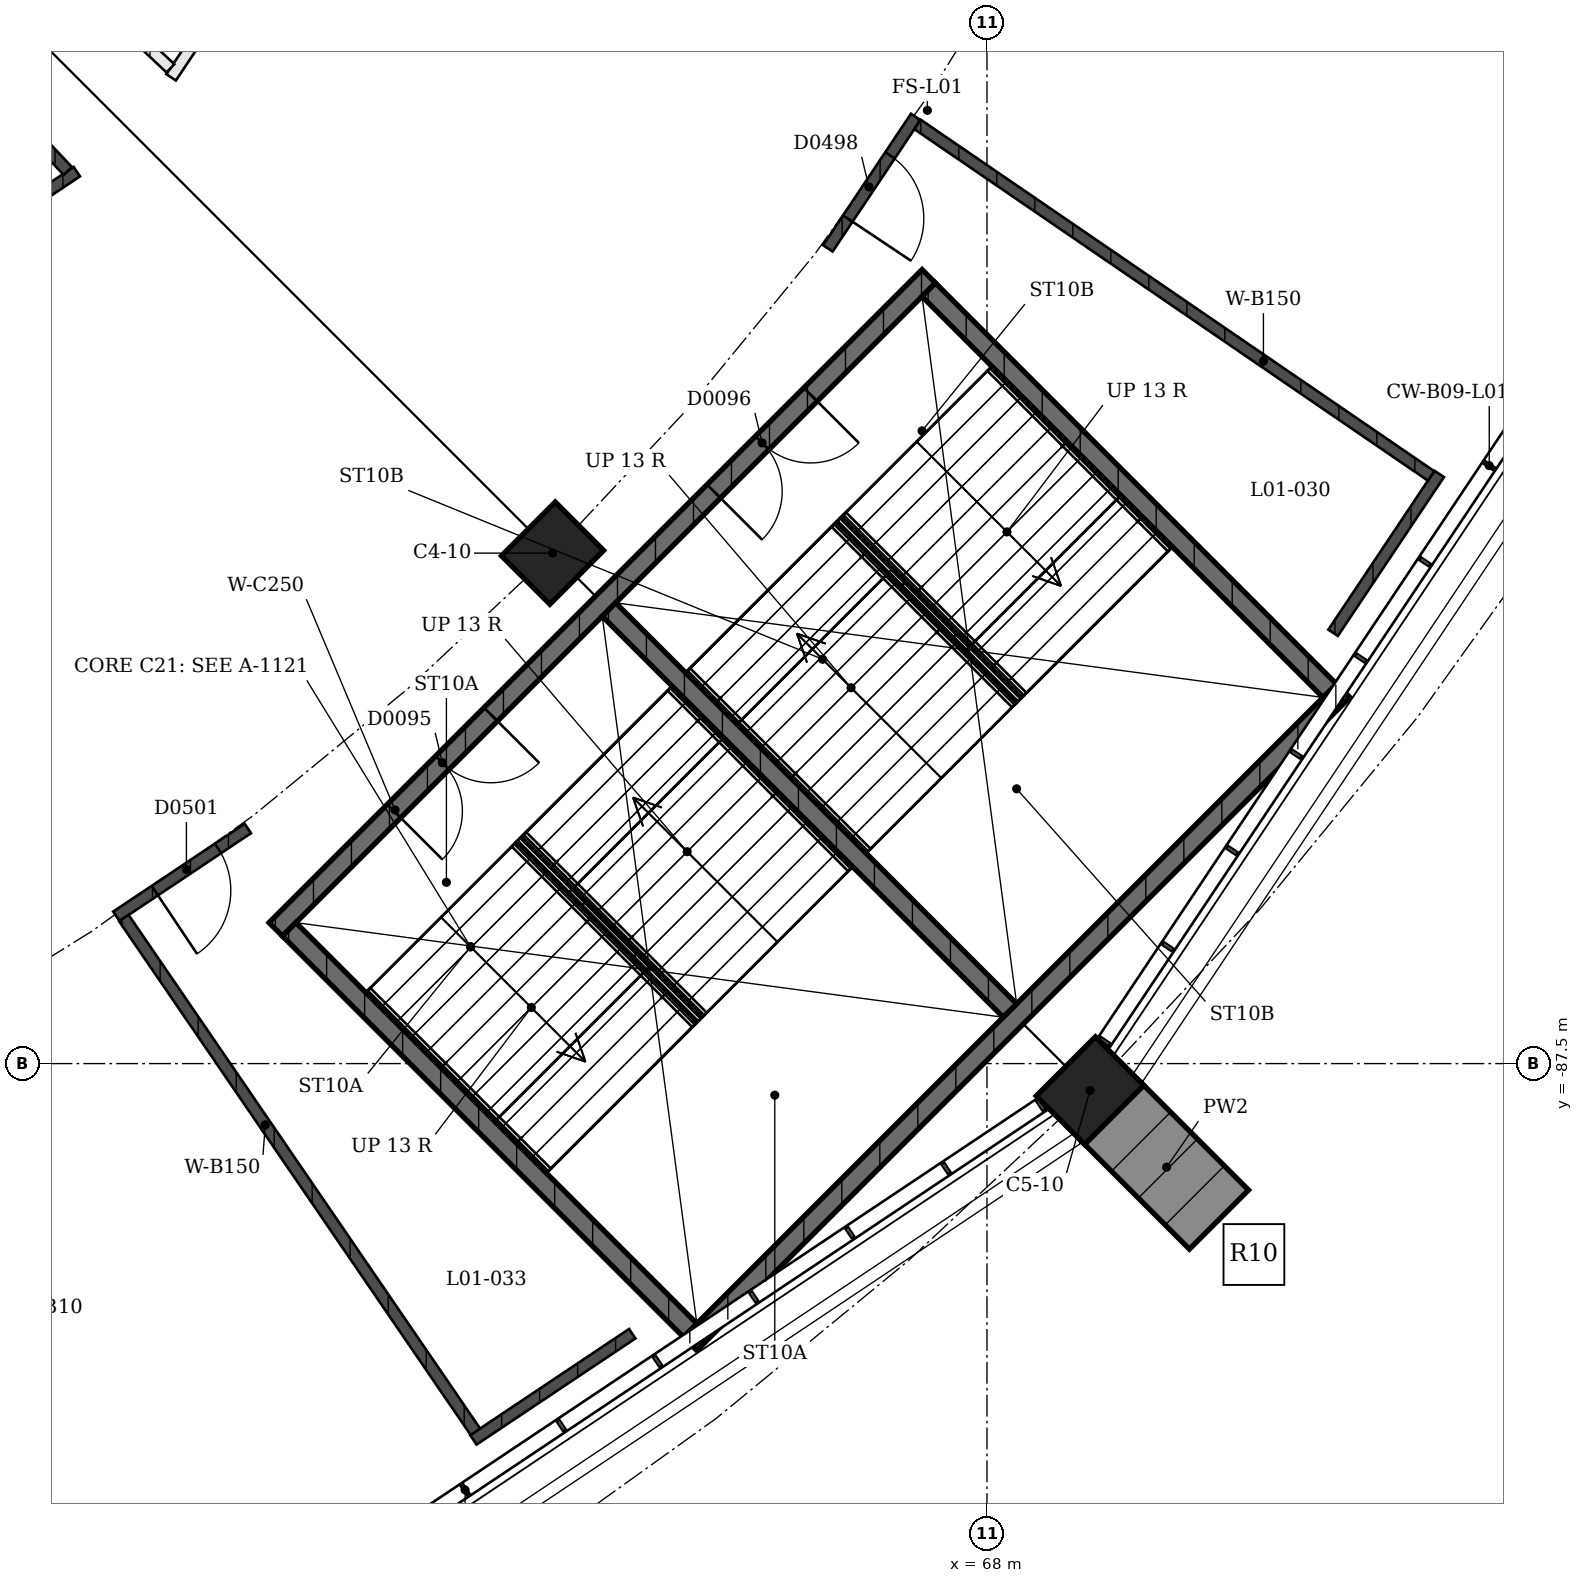
"""IFC4 building model, lengths in metres.
Left out: names, types, materials, properties, quantities, classifications, styles, units other than length and angle.
Written with IfcOpenShell. Run it as: python <this file> out.ifc"""

import sys

from ifc_helpers import new_model, si_unit, direction, frame, frame_2d, origin, origin_2d, place, context, subcontext, project, spatial, rectangle, extrude, element, fill, save


model = new_model("IFC4")
c1 = context("Model", 3, precision=1e-05, world=origin(), true_north=direction((0.0, 1.0)))
c2 = subcontext(c1, "Body", "Model", "MODEL_VIEW")
j1 = project(units=[si_unit("LENGTHUNIT", "METRE"), si_unit("PLANEANGLEUNIT", "RADIAN")], contexts=[c1])
p1 = place(None, origin())
s1 = spatial("IfcSite", under=j1, at=p1, CompositionType="ELEMENT")
p2 = place(p1, origin())
s2 = spatial("IfcBuilding", under=s1, at=p2, CompositionType="ELEMENT")
p3 = place(p2, frame((0.0, 0.0, 4.5)))
s3 = spatial("IfcBuildingStorey", under=s2, at=p3, CompositionType="ELEMENT", Elevation=4.5)
p4 = place(p3, frame((62.284, -80.784, 0.0), z_axis=(0.0, 0.0, 1.0), x_axis=(0.707106781187, 0.707106781187, 0.0)))
e1 = element("IfcColumn", 1, at=p4, inside=s3, PredefinedType="COLUMN", context=c2, shape_type="SweptSolid", body=[
    extrude(rectangle(XDim=1.0, YDim=0.9, at=origin_2d()), origin(), (0.0, 0.0, 1.0), 4.5),
])
p5 = place(p3, frame((69.355, -87.855, 0.0), z_axis=(0.0, 0.0, 1.0), x_axis=(0.707106781187, 0.707106781187, 0.0)))
e2 = element("IfcColumn", 2, at=p5, inside=s3, PredefinedType="COLUMN", context=c2, shape_type="SweptSolid", body=[
    extrude(rectangle(XDim=1.1, YDim=0.9, at=origin_2d()), origin(), (0.0, 0.0, 1.0), 4.5),
])
p6 = place(p3, frame((58.643, -85.734, 0.0), z_axis=(0.0, 0.0, 1.0), x_axis=(0.707106781187, 0.707106781187, 0.0)))
e3 = element("IfcWall", 3, at=p6, inside=s3, PredefinedType="SHEAR", context=c2, shape_type="SweptSolid", body=[
    extrude(rectangle(XDim=12.15, YDim=0.25, at=frame_2d((6.075, 0.0))), origin(), (0.0, 0.0, 1.0), 4.09),
])
p7 = place(p6, frame((2.2, 0.0, 0.0)))
e4 = element("IfcOpeningElement", 4, at=p7, cuts=e3, PredefinedType="OPENING", context=c2, shape_type="SweptSolid", body=[
    extrude(rectangle(XDim=1.8, YDim=2.1, at=frame_2d((0.9, 1.05))), frame((0.0, 0.125, 0.0), z_axis=(0.0, -1.0, 0.0), x_axis=(1.0, 0.0, 0.0)), (0.0, 0.0, 1.0), 0.25),
])
p8 = place(p6, frame((8.15, 0.0, 0.0)))
e5 = element("IfcOpeningElement", 5, at=p8, cuts=e3, PredefinedType="OPENING", context=c2, shape_type="SweptSolid", body=[
    extrude(rectangle(XDim=1.8, YDim=2.1, at=frame_2d((0.9, 1.05))), frame((0.0, 0.125, 0.0), z_axis=(0.0, -1.0, 0.0), x_axis=(1.0, 0.0, 0.0)), (0.0, 0.0, 1.0), 0.25),
])
p9 = place(p3, frame((64.094, -91.186, 0.0), z_axis=(0.0, 0.0, 1.0), x_axis=(0.707106781187, 0.707106781187, 0.0)))
e6 = element("IfcWall", 6, at=p9, inside=s3, PredefinedType="SHEAR", context=c2, shape_type="SweptSolid", body=[
    extrude(rectangle(XDim=12.15, YDim=0.25, at=frame_2d((6.075, 0.0))), origin(), (0.0, 0.0, 1.0), 4.09),
])
for number, where, z_axis, x_axis in (
    (7, (58.819, -85.734, 0.0), (0.0, 0.0, 1.0), (0.707, -0.707, 0.0)),
    (8, (67.234, -77.319, 0.0), (0.0, 0.0, 1.0), (0.707, -0.707, 0.0)),
):
    element("IfcWall", number, at=place(p3, frame(where, z_axis=z_axis, x_axis=x_axis)), inside=s3, PredefinedType="SHEAR", context=c2, shape_type="SweptSolid", body=[
        extrude(rectangle(XDim=7.46, YDim=0.25, at=frame_2d((3.73, 0.0))), origin(), (0.0, 0.0, 1.0), 4.09),
    ])
p10 = place(p3, frame((63.027, -81.527, 0.0), z_axis=(0.0, 0.0, 1.0), x_axis=(0.707106781187, -0.707106781187, 0.0)))
e9 = element("IfcWall", 9, at=p10, inside=s3, PredefinedType="SHEAR", context=c2, shape_type="SweptSolid", body=[
    extrude(rectangle(XDim=7.46, YDim=0.25, at=frame_2d((3.73, 0.0))), origin(), (0.0, 0.0, 1.0), 4.09),
])
p11 = place(p3, frame((57.266, -74.525, 0.0), z_axis=(0.0, 0.0, 1.0), x_axis=(0.555562662276, 0.831474670862, 0.0)))
e10 = element("IfcWall", 10, at=p11, inside=s3, PredefinedType="PARTITIONING", context=c2, shape_type="SweptSolid", body=[
    extrude(rectangle(XDim=10.775, YDim=0.15, at=frame_2d((5.387, 0.0))), origin(), (0.0, 0.0, 1.0), 3.0),
])
p12 = place(p11, frame((1.276, 0.0, 0.0)))
e11 = element("IfcOpeningElement", 11, at=p12, cuts=e10, PredefinedType="OPENING", context=c2, shape_type="SweptSolid", body=[
    extrude(rectangle(XDim=0.9, YDim=2.1, at=frame_2d((0.45, 1.05))), frame((0.0, 0.075, 0.0), z_axis=(0.0, -1.0, 0.0), x_axis=(1.0, 0.0, 0.0)), (0.0, 0.0, 1.0), 0.15),
])
p13 = place(p11, frame((4.566, 0.0, 0.0)))
e12 = element("IfcOpeningElement", 12, at=p13, cuts=e10, PredefinedType="OPENING", context=c2, shape_type="SweptSolid", body=[
    extrude(rectangle(XDim=0.9, YDim=2.1, at=frame_2d((0.45, 1.05))), frame((0.0, 0.075, 0.0), z_axis=(0.0, -1.0, 0.0), x_axis=(1.0, 0.0, 0.0)), (0.0, 0.0, 1.0), 0.15),
])
p14 = place(p11, frame((7.119, 0.0, 0.0)))
e13 = element("IfcOpeningElement", 13, at=p14, cuts=e10, PredefinedType="OPENING", context=c2, shape_type="SweptSolid", body=[
    extrude(rectangle(XDim=1.1, YDim=2.1, at=frame_2d((0.55, 1.05))), frame((0.0, 0.075, 0.0), z_axis=(0.0, -1.0, 0.0), x_axis=(1.0, 0.0, 0.0)), (0.0, 0.0, 1.0), 0.15),
])
p15 = place(p11, frame((9.135, 0.0, 0.0)))
e14 = element("IfcOpeningElement", 14, at=p15, cuts=e10, PredefinedType="OPENING", context=c2, shape_type="SweptSolid", body=[
    extrude(rectangle(XDim=1.1, YDim=2.1, at=frame_2d((0.55, 1.05))), frame((0.0, 0.075, 0.0), z_axis=(0.0, -1.0, 0.0), x_axis=(1.0, 0.0, 0.0)), (0.0, 0.0, 1.0), 0.15),
])
p16 = place(p3, frame((53.746, -71.099, 0.0), z_axis=(0.0, 0.0, 1.0), x_axis=(0.727898273696, -0.685685134118, 0.0)))
e15 = element("IfcWall", 15, at=p16, inside=s3, PredefinedType="PARTITIONING", context=c2, shape_type="SweptSolid", body=[
    extrude(rectangle(XDim=4.823, YDim=0.15, at=frame_2d((2.412, 0.0))), origin(), (0.0, 0.0, 1.0), 3.0),
])
p17 = place(p3, frame((65.907, -76.775, 0.0), z_axis=(0.0, 0.0, 1.0), x_axis=(0.555485387307, 0.831526298134, 0.0)))
e16 = element("IfcWall", 16, at=p17, inside=s3, PredefinedType="SOLIDWALL", context=c2, shape_type="SweptSolid", body=[
    extrude(rectangle(XDim=2.08, YDim=0.15, at=frame_2d((1.04, 0.0))), origin(), (0.0, 0.0, 1.0), 3.0),
])
p18 = place(p17, frame((0.472, 0.0, 0.0)))
e17 = element("IfcOpeningElement", 17, at=p18, cuts=e16, PredefinedType="OPENING", context=c2, shape_type="SweptSolid", body=[
    extrude(rectangle(XDim=1.0, YDim=2.1, at=frame_2d((0.5, 1.05))), frame((0.0, 0.075, 0.0), z_axis=(0.0, -1.0, 0.0), x_axis=(1.0, 0.0, 0.0)), (0.0, 0.0, 1.0), 0.15),
])
p19 = place(p3, frame((72.554, -81.833, 0.0), z_axis=(0.0, 0.0, 1.0), x_axis=(0.555551611961, 0.831482054195, 0.0)))
e18 = element("IfcWall", 18, at=p19, inside=s3, PredefinedType="SOLIDWALL", context=c2, shape_type="SweptSolid", body=[
    extrude(rectangle(XDim=2.514, YDim=0.15, at=frame_2d((1.257, 0.0))), origin(), (0.0, 0.0, 1.0), 3.0),
])
p20 = place(p3, frame((67.085, -75.144, 0.0), z_axis=(0.0, 0.0, 1.0), x_axis=(0.825237791444, -0.564785434986, 0.0)))
e19 = element("IfcWall", 19, at=p20, inside=s3, PredefinedType="SOLIDWALL", context=c2, shape_type="SweptSolid", body=[
    extrude(rectangle(XDim=8.19, YDim=0.15, at=frame_2d((4.095, 0.0))), origin(), (0.0, 0.0, 1.0), 3.0),
])
p21 = place(p3, frame((56.025, -75.766, 0.0), z_axis=(0.0, 0.0, 1.0), x_axis=(-0.831478677095, -0.55555666636, 0.0)))
e20 = element("IfcWall", 20, at=p21, inside=s3, PredefinedType="SOLIDWALL", context=c2, shape_type="SweptSolid", body=[
    extrude(rectangle(XDim=11.113, YDim=0.15, at=frame_2d((5.557, 0.0))), origin(), (0.0, 0.0, 1.0), 3.0),
])
p22 = place(p21, frame((2.319, 0.0, 0.0)))
e21 = element("IfcOpeningElement", 21, at=p22, cuts=e20, PredefinedType="OPENING", context=c2, shape_type="SweptSolid", body=[
    extrude(rectangle(XDim=1.0, YDim=2.1, at=frame_2d((0.5, 1.05))), frame((0.0, 0.075, 0.0), z_axis=(0.0, -1.0, 0.0), x_axis=(1.0, 0.0, 0.0)), (0.0, 0.0, 1.0), 0.15),
])
p23 = place(p21, frame((7.794, 0.0, 0.0)))
e22 = element("IfcOpeningElement", 22, at=p23, cuts=e20, PredefinedType="OPENING", context=c2, shape_type="SweptSolid", body=[
    extrude(rectangle(XDim=1.0, YDim=2.1, at=frame_2d((0.5, 1.05))), frame((0.0, 0.075, 0.0), z_axis=(0.0, -1.0, 0.0), x_axis=(1.0, 0.0, 0.0)), (0.0, 0.0, 1.0), 0.15),
])
p24 = place(p3, frame((52.599, -72.246, 0.0), z_axis=(0.0, 0.0, 1.0), x_axis=(0.685685134118, -0.727898273696, 0.0)))
e23 = element("IfcWall", 23, at=p24, inside=s3, PredefinedType="SOLIDWALL", context=c2, shape_type="SweptSolid", body=[
    extrude(rectangle(XDim=4.823, YDim=0.15, at=frame_2d((2.412, 0.0))), origin(), (0.0, 0.0, 1.0), 3.0),
])
p25 = place(p3, frame((58.275, -84.407, 0.0), z_axis=(0.0, 0.0, 1.0), x_axis=(-0.831526298134, -0.555485387307, 0.0)))
e24 = element("IfcWall", 24, at=p25, inside=s3, PredefinedType="SOLIDWALL", context=c2, shape_type="SweptSolid", body=[
    extrude(rectangle(XDim=2.08, YDim=0.15, at=frame_2d((1.04, 0.0))), origin(), (0.0, 0.0, 1.0), 3.0),
])
p26 = place(p25, frame((0.472, 0.0, 0.0)))
e25 = element("IfcOpeningElement", 25, at=p26, cuts=e24, PredefinedType="OPENING", context=c2, shape_type="SweptSolid", body=[
    extrude(rectangle(XDim=1.0, YDim=2.1, at=frame_2d((0.5, 1.05))), frame((0.0, 0.075, 0.0), z_axis=(0.0, -1.0, 0.0), x_axis=(1.0, 0.0, 0.0)), (0.0, 0.0, 1.0), 0.15),
])
p27 = place(p3, frame((63.333, -91.054, 0.0), z_axis=(0.0, 0.0, 1.0), x_axis=(-0.831482054195, -0.555551611961, 0.0)))
e26 = element("IfcWall", 26, at=p27, inside=s3, PredefinedType="SOLIDWALL", context=c2, shape_type="SweptSolid", body=[
    extrude(rectangle(XDim=2.514, YDim=0.15, at=frame_2d((1.257, 0.0))), origin(), (0.0, 0.0, 1.0), 3.0),
])
p28 = place(p3, frame((56.644, -85.585, 0.0), z_axis=(0.0, 0.0, 1.0), x_axis=(0.564785434986, -0.825237791444, 0.0)))
e27 = element("IfcWall", 27, at=p28, inside=s3, PredefinedType="SOLIDWALL", context=c2, shape_type="SweptSolid", body=[
    extrude(rectangle(XDim=8.19, YDim=0.15, at=frame_2d((4.095, 0.0))), origin(), (0.0, 0.0, 1.0), 3.0),
])
p29 = place(p7, origin())
e28 = element("IfcDoor", 28, at=p29, inside=s3, OperationType="DOUBLE_DOOR_SINGLE_SWING", PredefinedType="DOOR", context=c2, shape_type="SweptSolid", body=[
    extrude(rectangle(XDim=1.8, YDim=2.1, at=frame_2d((0.9, 1.05))), frame((0.0, 0.025, 0.0), z_axis=(0.0, -1.0, 0.0), x_axis=(1.0, 0.0, 0.0)), (0.0, 0.0, 1.0), 0.05),
])
fill(e4, e28)
p30 = place(p8, origin())
e29 = element("IfcDoor", 29, at=p30, inside=s3, OperationType="DOUBLE_DOOR_SINGLE_SWING", PredefinedType="DOOR", context=c2, shape_type="SweptSolid", body=[
    extrude(rectangle(XDim=1.8, YDim=2.1, at=frame_2d((0.9, 1.05))), frame((0.0, 0.025, 0.0), z_axis=(0.0, -1.0, 0.0), x_axis=(1.0, 0.0, 0.0)), (0.0, 0.0, 1.0), 0.05),
])
fill(e5, e29)
p31 = place(p18, origin())
e30 = element("IfcDoor", 30, at=p31, inside=s3, OperationType="SINGLE_SWING_LEFT", PredefinedType="DOOR", context=c2, shape_type="SweptSolid", body=[
    extrude(rectangle(XDim=1.0, YDim=2.1, at=frame_2d((0.5, 1.05))), frame((0.0, 0.025, 0.0), z_axis=(0.0, -1.0, 0.0), x_axis=(1.0, 0.0, 0.0)), (0.0, 0.0, 1.0), 0.05),
])
fill(e17, e30)
p32 = place(p26, origin())
e31 = element("IfcDoor", 31, at=p32, inside=s3, OperationType="SINGLE_SWING_LEFT", PredefinedType="DOOR", context=c2, shape_type="SweptSolid", body=[
    extrude(rectangle(XDim=1.0, YDim=2.1, at=frame_2d((0.5, 1.05))), frame((0.0, 0.025, 0.0), z_axis=(0.0, -1.0, 0.0), x_axis=(1.0, 0.0, 0.0)), (0.0, 0.0, 1.0), 0.05),
])
fill(e25, e31)
save(model, sys.argv[1])
